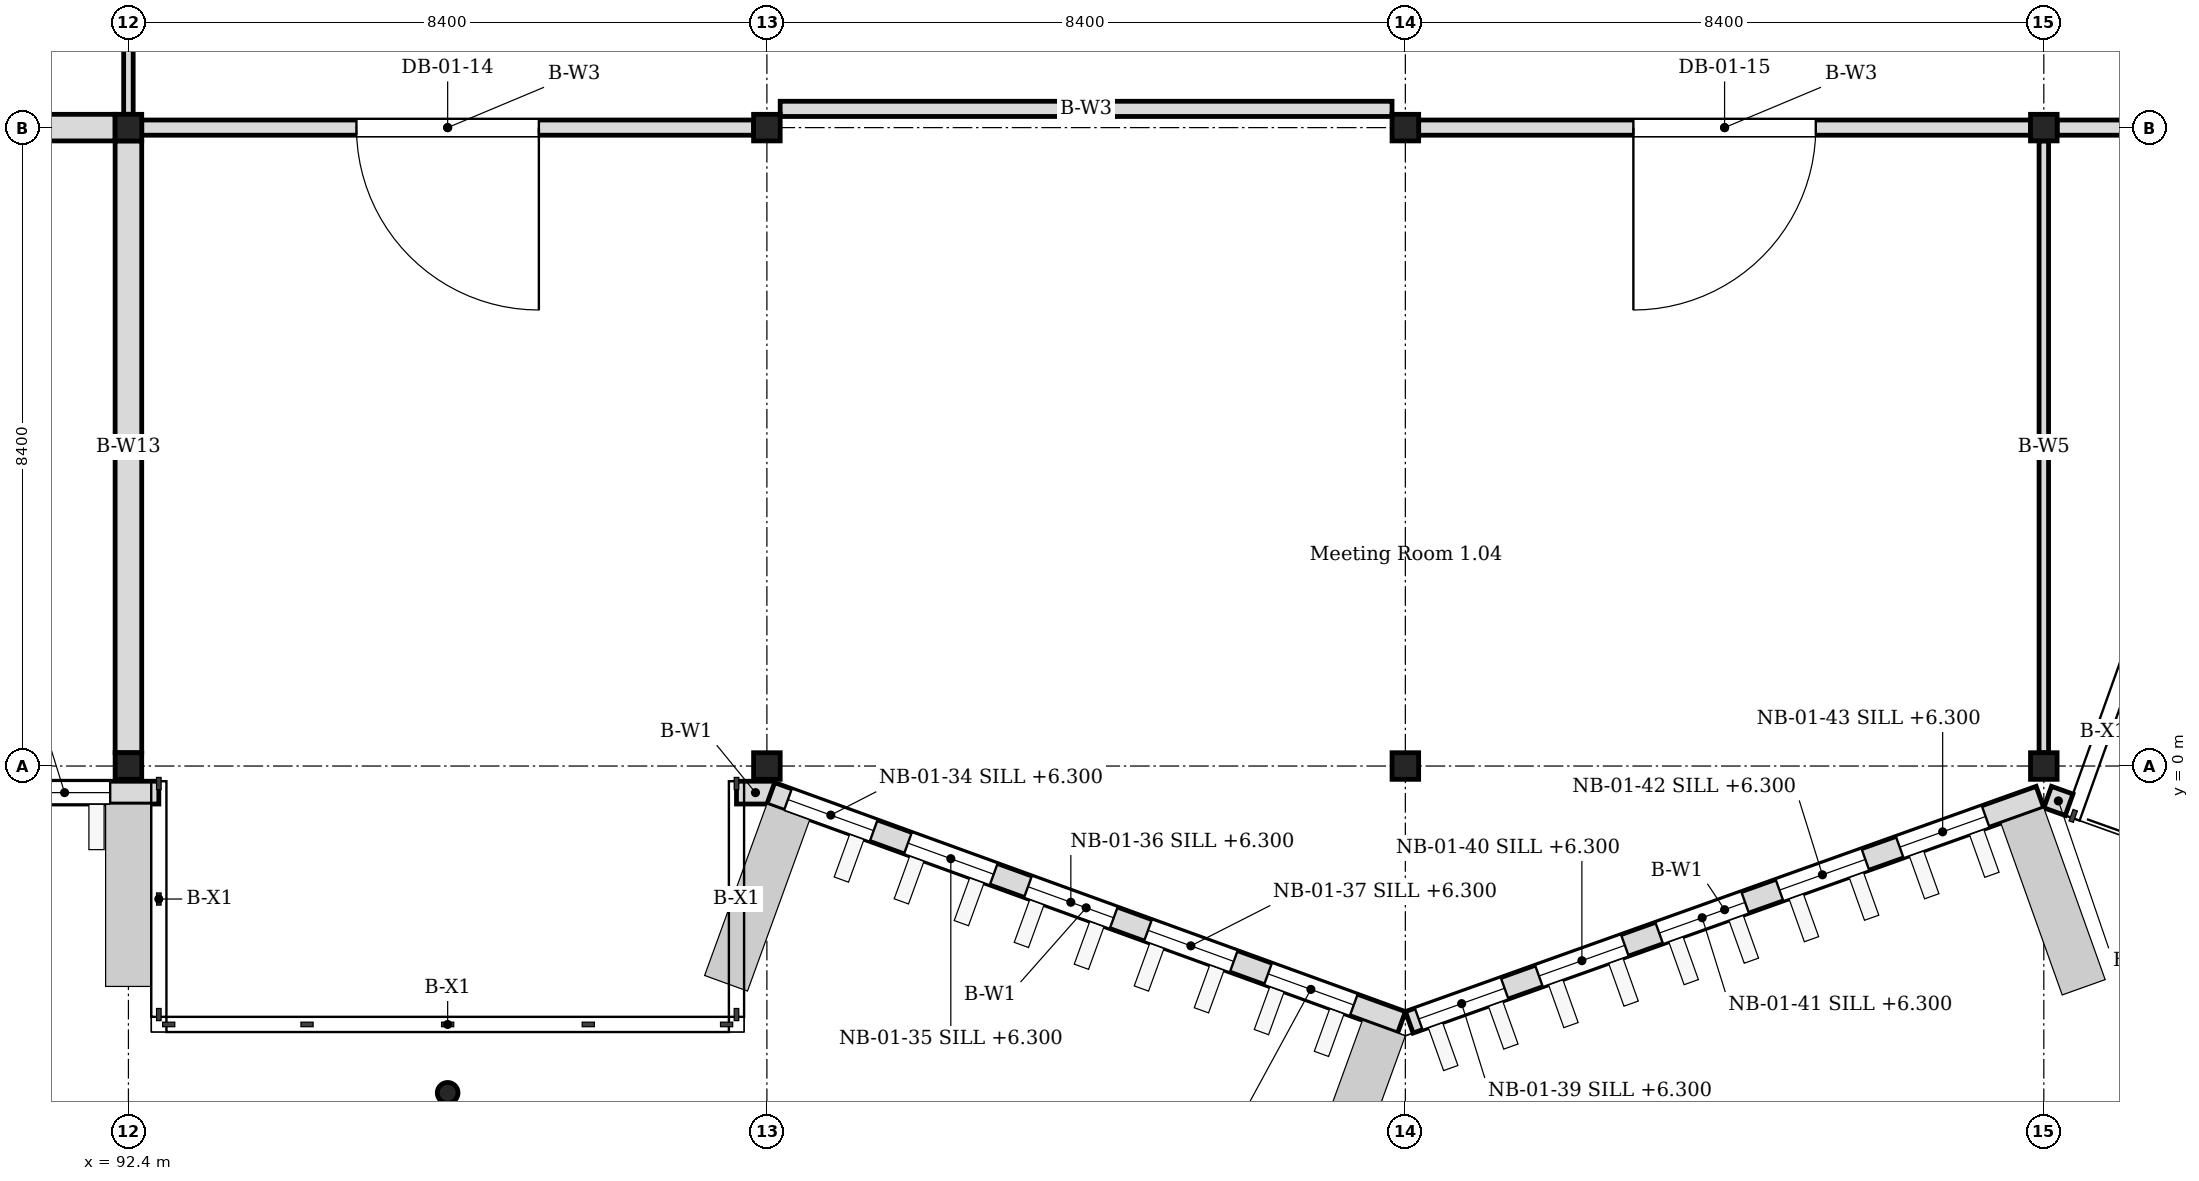
"""IFC4 building model, lengths in metres.
Left out: names, types, materials, properties, quantities, classifications, styles, units other than length and angle.
Written with IfcOpenShell. Run it as: python <this file> out.ifc"""

import sys

from ifc_helpers import new_model, si_unit, direction, frame, frame_2d, origin, origin_2d, place, context, subcontext, project, spatial, rectangle, hollow_circle, i_section, extrude, element, fill, save


model = new_model("IFC4")
c1 = context("Model", 3, precision=1e-05, world=origin(), true_north=direction((0.0, 1.0)))
c2 = subcontext(c1, "Body", "Model", "MODEL_VIEW")
j1 = project(units=[si_unit("LENGTHUNIT", "METRE"), si_unit("PLANEANGLEUNIT", "RADIAN")], contexts=[c1])
p1 = place(None, origin())
s1 = spatial("IfcSite", under=j1, at=p1, CompositionType="ELEMENT")
p2 = place(p1, origin())
s2 = spatial("IfcBuilding", under=s1, at=p2, CompositionType="ELEMENT")
p3 = place(p2, frame((0.0, 0.0, 6.0)))
s3 = spatial("IfcBuildingStorey", under=s2, at=p3, CompositionType="ELEMENT", Elevation=6.0)
for number, where, z_axis, x_axis in (
    (1, (92.4, 0.0, 0.0), (0.0, 0.0, 1.0), (1.0, 0.0, 0.0)),
    (2, (92.4, 8.4, 0.0), (0.0, 0.0, 1.0), (1.0, 0.0, 0.0)),
    (3, (100.8, 0.0, 0.0), (0.0, 0.0, 1.0), (1.0, 0.0, 0.0)),
    (4, (100.8, 8.4, 0.0), (0.0, 0.0, 1.0), (1.0, 0.0, 0.0)),
    (5, (109.2, 0.0, 0.0), (0.0, 0.0, 1.0), (1.0, 0.0, 0.0)),
    (6, (109.2, 8.4, 0.0), (0.0, 0.0, 1.0), (1.0, 0.0, 0.0)),
    (7, (117.6, 0.0, 0.0), (0.0, 0.0, 1.0), (1.0, 0.0, 0.0)),
    (8, (117.6, 8.4, 0.0), (0.0, 0.0, 1.0), (1.0, 0.0, 0.0)),
):
    element("IfcColumn", number, at=place(p3, frame(where, z_axis=z_axis, x_axis=x_axis)), inside=s3, PredefinedType="COLUMN", context=c2, shape_type="SweptSolid", body=[
        extrude(i_section(OverallWidth=0.35, OverallDepth=0.35, WebThickness=0.012, FlangeThickness=0.019, FilletRadius=0.013, at=origin_2d()), origin(), (0.0, 0.0, 1.0), 4.2),
    ])
p4 = place(p2, origin())
s4 = spatial("IfcBuildingStorey", under=s2, at=p4, CompositionType="ELEMENT", Elevation=0.0)
p5 = place(p4, frame((96.6, -4.3, 0.0), z_axis=(0.0, 0.0, 1.0), x_axis=(1.0, 0.0, 0.0)))
e9 = element("IfcColumn", 9, at=p5, inside=s4, PredefinedType="COLUMN", context=c2, shape_type="SweptSolid", body=[
    extrude(hollow_circle(Radius=0.136, WallThickness=0.012, at=origin_2d()), origin(), (0.0, 0.0, 1.0), 8.47),
])
p6 = place(p3, frame((83.6, -0.35, 0.0), z_axis=(0.0, 0.0, 1.0), x_axis=(1.0, 0.0, 0.0)))
e10 = element("IfcWall", 10, at=p6, inside=s3, PredefinedType="SOLIDWALL", context=c2, shape_type="SweptSolid", body=[
    extrude(rectangle(XDim=9.2, YDim=0.3, at=frame_2d((4.6, 0.0))), origin(), (0.0, 0.0, 1.0), 4.05),
])
p7 = place(p6, frame((0.64, 0.0, 0.3)))
e11 = element("IfcOpeningElement", 11, at=p7, cuts=e10, PredefinedType="OPENING", context=c2, shape_type="SweptSolid", body=[
    extrude(rectangle(XDim=1.2, YDim=3.3, at=frame_2d((0.6, 1.65))), frame((0.0, 0.16, 0.0), z_axis=(0.0, -1.0, 0.0), x_axis=(1.0, 0.0, 0.0)), (0.0, 0.0, 1.0), 0.32),
])
p8 = place(p6, frame((2.32, 0.0, 0.3)))
e12 = element("IfcOpeningElement", 12, at=p8, cuts=e10, PredefinedType="OPENING", context=c2, shape_type="SweptSolid", body=[
    extrude(rectangle(XDim=1.2, YDim=3.3, at=frame_2d((0.6, 1.65))), frame((0.0, 0.16, 0.0), z_axis=(0.0, -1.0, 0.0), x_axis=(1.0, 0.0, 0.0)), (0.0, 0.0, 1.0), 0.32),
])
p9 = place(p6, frame((4.0, 0.0, 0.3)))
e13 = element("IfcOpeningElement", 13, at=p9, cuts=e10, PredefinedType="OPENING", context=c2, shape_type="SweptSolid", body=[
    extrude(rectangle(XDim=1.2, YDim=3.3, at=frame_2d((0.6, 1.65))), frame((0.0, 0.16, 0.0), z_axis=(0.0, -1.0, 0.0), x_axis=(1.0, 0.0, 0.0)), (0.0, 0.0, 1.0), 0.32),
])
p10 = place(p6, frame((5.68, 0.0, 0.3)))
e14 = element("IfcOpeningElement", 14, at=p10, cuts=e10, PredefinedType="OPENING", context=c2, shape_type="SweptSolid", body=[
    extrude(rectangle(XDim=1.2, YDim=3.3, at=frame_2d((0.6, 1.65))), frame((0.0, 0.16, 0.0), z_axis=(0.0, -1.0, 0.0), x_axis=(1.0, 0.0, 0.0)), (0.0, 0.0, 1.0), 0.32),
])
p11 = place(p6, frame((7.36, 0.0, 0.3)))
e15 = element("IfcOpeningElement", 15, at=p11, cuts=e10, PredefinedType="OPENING", context=c2, shape_type="SweptSolid", body=[
    extrude(rectangle(XDim=1.2, YDim=3.3, at=frame_2d((0.6, 1.65))), frame((0.0, 0.16, 0.0), z_axis=(0.0, -1.0, 0.0), x_axis=(1.0, 0.0, 0.0)), (0.0, 0.0, 1.0), 0.32),
])
p12 = place(p3, frame((100.4, -0.35, 0.0), z_axis=(0.0, 0.0, 1.0), x_axis=(1.0, 0.0, 0.0)))
e16 = element("IfcWall", 16, at=p12, inside=s3, PredefinedType="SOLIDWALL", context=c2, shape_type="SweptSolid", body=[
    extrude(rectangle(XDim=0.5, YDim=0.3, at=frame_2d((0.25, 0.0))), origin(), (0.0, 0.0, 1.0), 4.05),
])
p13 = place(p3, frame((100.851, -0.359, 0.0), z_axis=(0.0, 0.0, 1.0), x_axis=(0.939953187971, -0.341303390584, 0.0)))
e17 = element("IfcWall", 17, at=p13, inside=s3, PredefinedType="SOLIDWALL", context=c2, shape_type="SweptSolid", body=[
    extrude(rectangle(XDim=8.828, YDim=0.3, at=frame_2d((4.414, 0.0))), origin(), (0.0, 0.0, 1.0), 4.05),
])
p14 = place(p13, frame((0.24, 0.0, 0.3)))
e18 = element("IfcOpeningElement", 18, at=p14, cuts=e17, PredefinedType="OPENING", context=c2, shape_type="SweptSolid", body=[
    extrude(rectangle(XDim=1.2, YDim=3.3, at=frame_2d((0.6, 1.65))), frame((0.0, 0.16, 0.0), z_axis=(0.0, -1.0, 0.0), x_axis=(1.0, 0.0, 0.0)), (0.0, 0.0, 1.0), 0.32),
])
p15 = place(p13, frame((1.92, 0.0, 0.3)))
e19 = element("IfcOpeningElement", 19, at=p15, cuts=e17, PredefinedType="OPENING", context=c2, shape_type="SweptSolid", body=[
    extrude(rectangle(XDim=1.2, YDim=3.3, at=frame_2d((0.6, 1.65))), frame((0.0, 0.16, 0.0), z_axis=(0.0, -1.0, 0.0), x_axis=(1.0, 0.0, 0.0)), (0.0, 0.0, 1.0), 0.32),
])
p16 = place(p13, frame((3.6, 0.0, 0.3)))
e20 = element("IfcOpeningElement", 20, at=p16, cuts=e17, PredefinedType="OPENING", context=c2, shape_type="SweptSolid", body=[
    extrude(rectangle(XDim=1.2, YDim=3.3, at=frame_2d((0.6, 1.65))), frame((0.0, 0.16, 0.0), z_axis=(0.0, -1.0, 0.0), x_axis=(1.0, 0.0, 0.0)), (0.0, 0.0, 1.0), 0.32),
])
p17 = place(p13, frame((5.28, 0.0, 0.3)))
e21 = element("IfcOpeningElement", 21, at=p17, cuts=e17, PredefinedType="OPENING", context=c2, shape_type="SweptSolid", body=[
    extrude(rectangle(XDim=1.2, YDim=3.3, at=frame_2d((0.6, 1.65))), frame((0.0, 0.16, 0.0), z_axis=(0.0, -1.0, 0.0), x_axis=(1.0, 0.0, 0.0)), (0.0, 0.0, 1.0), 0.32),
])
p18 = place(p13, frame((6.96, 0.0, 0.3)))
e22 = element("IfcOpeningElement", 22, at=p18, cuts=e17, PredefinedType="OPENING", context=c2, shape_type="SweptSolid", body=[
    extrude(rectangle(XDim=1.2, YDim=3.3, at=frame_2d((0.6, 1.65))), frame((0.0, 0.16, 0.0), z_axis=(0.0, -1.0, 0.0), x_axis=(1.0, 0.0, 0.0)), (0.0, 0.0, 1.0), 0.32),
])
p19 = place(p3, frame((109.251, -3.372, 0.0), z_axis=(0.0, 0.0, 1.0), x_axis=(0.941744418946, 0.336329376334, 0.0)))
e23 = element("IfcWall", 23, at=p19, inside=s3, PredefinedType="SOLIDWALL", context=c2, shape_type="SweptSolid", body=[
    extrude(rectangle(XDim=8.812, YDim=0.3, at=frame_2d((4.406, 0.0))), origin(), (0.0, 0.0, 1.0), 4.05),
])
p20 = place(p19, frame((0.132, 0.0, 0.3)))
e24 = element("IfcOpeningElement", 24, at=p20, cuts=e23, PredefinedType="OPENING", context=c2, shape_type="SweptSolid", body=[
    extrude(rectangle(XDim=1.2, YDim=3.3, at=frame_2d((0.6, 1.65))), frame((0.0, 0.16, 0.0), z_axis=(0.0, -1.0, 0.0), x_axis=(1.0, 0.0, 0.0)), (0.0, 0.0, 1.0), 0.32),
])
p21 = place(p19, frame((1.812, 0.0, 0.3)))
e25 = element("IfcOpeningElement", 25, at=p21, cuts=e23, PredefinedType="OPENING", context=c2, shape_type="SweptSolid", body=[
    extrude(rectangle(XDim=1.2, YDim=3.3, at=frame_2d((0.6, 1.65))), frame((0.0, 0.16, 0.0), z_axis=(0.0, -1.0, 0.0), x_axis=(1.0, 0.0, 0.0)), (0.0, 0.0, 1.0), 0.32),
])
p22 = place(p19, frame((3.492, 0.0, 0.3)))
e26 = element("IfcOpeningElement", 26, at=p22, cuts=e23, PredefinedType="OPENING", context=c2, shape_type="SweptSolid", body=[
    extrude(rectangle(XDim=1.2, YDim=3.3, at=frame_2d((0.6, 1.65))), frame((0.0, 0.16, 0.0), z_axis=(0.0, -1.0, 0.0), x_axis=(1.0, 0.0, 0.0)), (0.0, 0.0, 1.0), 0.32),
])
p23 = place(p19, frame((5.172, 0.0, 0.3)))
e27 = element("IfcOpeningElement", 27, at=p23, cuts=e23, PredefinedType="OPENING", context=c2, shape_type="SweptSolid", body=[
    extrude(rectangle(XDim=1.2, YDim=3.3, at=frame_2d((0.6, 1.65))), frame((0.0, 0.16, 0.0), z_axis=(0.0, -1.0, 0.0), x_axis=(1.0, 0.0, 0.0)), (0.0, 0.0, 1.0), 0.32),
])
p24 = place(p19, frame((6.852, 0.0, 0.3)))
e28 = element("IfcOpeningElement", 28, at=p24, cuts=e23, PredefinedType="OPENING", context=c2, shape_type="SweptSolid", body=[
    extrude(rectangle(XDim=1.2, YDim=3.3, at=frame_2d((0.6, 1.65))), frame((0.0, 0.16, 0.0), z_axis=(0.0, -1.0, 0.0), x_axis=(1.0, 0.0, 0.0)), (0.0, 0.0, 1.0), 0.32),
])
p25 = place(p3, frame((117.65, -0.409, 0.0), z_axis=(0.0, 0.0, 1.0), x_axis=(0.941889038699, -0.335924156289, 0.0)))
e29 = element("IfcWall", 29, at=p25, inside=s3, PredefinedType="SOLIDWALL", context=c2, shape_type="SweptSolid", body=[
    extrude(rectangle(XDim=0.3, YDim=0.3, at=frame_2d((0.15, 0.0))), origin(), (0.0, 0.0, 1.0), 4.05),
])
p26 = place(p3, frame((84.175, 8.4, 0.0), z_axis=(0.0, 0.0, 1.0), x_axis=(1.0, 0.0, 0.0)))
e30 = element("IfcWall", 30, at=p26, inside=s3, PredefinedType="PARTITIONING", context=c2, shape_type="SweptSolid", body=[
    extrude(rectangle(XDim=8.05, YDim=0.35, at=frame_2d((4.025, 0.0))), origin(), (0.0, 0.0, 1.0), 3.35),
])
p27 = place(p26, frame((3.475, 0.0, 0.0)))
e31 = element("IfcOpeningElement", 31, at=p27, cuts=e30, PredefinedType="OPENING", context=c2, shape_type="SweptSolid", body=[
    extrude(rectangle(XDim=1.1, YDim=2.4, at=frame_2d((0.55, 1.2))), frame((0.0, 0.185, 0.0), z_axis=(0.0, -1.0, 0.0), x_axis=(1.0, 0.0, 0.0)), (0.0, 0.0, 1.0), 0.37),
])
p28 = place(p3, frame((92.575, 8.4, 0.0), z_axis=(0.0, 0.0, 1.0), x_axis=(1.0, 0.0, 0.0)))
e32 = element("IfcWall", 32, at=p28, inside=s3, PredefinedType="PARTITIONING", context=c2, shape_type="SweptSolid", body=[
    extrude(rectangle(XDim=8.05, YDim=0.2, at=frame_2d((4.025, 0.0))), origin(), (0.0, 0.0, 1.0), 3.35),
])
p29 = place(p28, frame((2.825, 0.0, 0.0)))
e33 = element("IfcOpeningElement", 33, at=p29, cuts=e32, PredefinedType="OPENING", context=c2, shape_type="SweptSolid", body=[
    extrude(rectangle(XDim=2.4, YDim=2.2, at=frame_2d((1.2, 1.1))), frame((0.0, 0.11, 0.0), z_axis=(0.0, -1.0, 0.0), x_axis=(1.0, 0.0, 0.0)), (0.0, 0.0, 1.0), 0.22),
])
p30 = place(p3, frame((100.975, 8.646, 0.0), z_axis=(0.0, 0.0, 1.0), x_axis=(1.0, 0.0, 0.0)))
e34 = element("IfcWall", 34, at=p30, inside=s3, PredefinedType="PARTITIONING", context=c2, shape_type="SweptSolid", body=[
    extrude(rectangle(XDim=8.05, YDim=0.2, at=frame_2d((4.025, 0.0))), origin(), (0.0, 0.0, 1.0), 3.35),
])
p31 = place(p3, frame((109.375, 8.4, 0.0), z_axis=(0.0, 0.0, 1.0), x_axis=(1.0, 0.0, 0.0)))
e35 = element("IfcWall", 35, at=p31, inside=s3, PredefinedType="PARTITIONING", context=c2, shape_type="SweptSolid", body=[
    extrude(rectangle(XDim=8.05, YDim=0.2, at=frame_2d((4.025, 0.0))), origin(), (0.0, 0.0, 1.0), 3.35),
])
p32 = place(p31, frame((2.825, 0.0, 0.0)))
e36 = element("IfcOpeningElement", 36, at=p32, cuts=e35, PredefinedType="OPENING", context=c2, shape_type="SweptSolid", body=[
    extrude(rectangle(XDim=2.4, YDim=2.2, at=frame_2d((1.2, 1.1))), frame((0.0, 0.11, 0.0), z_axis=(0.0, -1.0, 0.0), x_axis=(1.0, 0.0, 0.0)), (0.0, 0.0, 1.0), 0.22),
])
p33 = place(p3, frame((117.775, 8.4, 0.0), z_axis=(0.0, 0.0, 1.0), x_axis=(1.0, 0.0, 0.0)))
e37 = element("IfcWall", 37, at=p33, inside=s3, PredefinedType="PARTITIONING", context=c2, shape_type="SweptSolid", body=[
    extrude(rectangle(XDim=8.05, YDim=0.2, at=frame_2d((4.025, 0.0))), origin(), (0.0, 0.0, 1.0), 3.35),
])
p34 = place(p33, frame((3.125, 0.0, 0.0)))
e38 = element("IfcOpeningElement", 38, at=p34, cuts=e37, PredefinedType="OPENING", context=c2, shape_type="SweptSolid", body=[
    extrude(rectangle(XDim=1.8, YDim=2.1, at=frame_2d((0.9, 1.05))), frame((0.0, 0.11, 0.0), z_axis=(0.0, -1.0, 0.0), x_axis=(1.0, 0.0, 0.0)), (0.0, 0.0, 1.0), 0.22),
])
p35 = place(p3, frame((92.4, 0.175, 0.0), z_axis=(0.0, 0.0, 1.0), x_axis=(0.0, 1.0, 0.0)))
e39 = element("IfcWall", 39, at=p35, inside=s3, PredefinedType="PARTITIONING", context=c2, shape_type="SweptSolid", body=[
    extrude(rectangle(XDim=8.05, YDim=0.35, at=frame_2d((4.025, 0.0))), origin(), (0.0, 0.0, 1.0), 3.35),
])
p36 = place(p3, frame((92.4, 8.575, 0.0), z_axis=(0.0, 0.0, 1.0), x_axis=(0.0, 1.0, 0.0)))
e40 = element("IfcWall", 40, at=p36, inside=s3, PredefinedType="PARTITIONING", context=c2, shape_type="SweptSolid", body=[
    extrude(rectangle(XDim=8.05, YDim=0.125, at=frame_2d((4.025, 0.0))), origin(), (0.0, 0.0, 1.0), 3.35),
])
p37 = place(p36, frame((2.825, 0.0, 0.0)))
e41 = element("IfcOpeningElement", 41, at=p37, cuts=e40, PredefinedType="OPENING", context=c2, shape_type="SweptSolid", body=[
    extrude(rectangle(XDim=2.4, YDim=2.2, at=frame_2d((1.2, 1.1))), frame((0.0, 0.073, 0.0), z_axis=(0.0, -1.0, 0.0), x_axis=(1.0, 0.0, 0.0)), (0.0, 0.0, 1.0), 0.145),
])
p38 = place(p3, frame((117.6, 0.175, 0.0), z_axis=(0.0, 0.0, 1.0), x_axis=(0.0, 1.0, 0.0)))
e42 = element("IfcWall", 42, at=p38, inside=s3, PredefinedType="MOVABLE", context=c2, shape_type="SweptSolid", body=[
    extrude(rectangle(XDim=8.05, YDim=0.125, at=frame_2d((4.025, 0.0))), origin(), (0.0, 0.0, 1.0), 3.35),
])
p39 = place(p11, origin())
e43 = element("IfcWindow", 43, at=p39, inside=s3, PartitioningType="TRIPLE_PANEL_VERTICAL", PredefinedType="WINDOW", context=c2, shape_type="SweptSolid", body=[
    extrude(rectangle(XDim=1.2, YDim=3.3, at=frame_2d((0.6, 1.65))), frame((0.0, 0.03, 0.0), z_axis=(0.0, -1.0, 0.0), x_axis=(1.0, 0.0, 0.0)), (0.0, 0.0, 1.0), 0.06),
])
fill(e15, e43)
p40 = place(p14, origin())
e44 = element("IfcWindow", 44, at=p40, inside=s3, PartitioningType="TRIPLE_PANEL_VERTICAL", PredefinedType="WINDOW", context=c2, shape_type="SweptSolid", body=[
    extrude(rectangle(XDim=1.2, YDim=3.3, at=frame_2d((0.6, 1.65))), frame((0.0, 0.03, 0.0), z_axis=(0.0, -1.0, 0.0), x_axis=(1.0, 0.0, 0.0)), (0.0, 0.0, 1.0), 0.06),
])
fill(e18, e44)
p41 = place(p15, origin())
e45 = element("IfcWindow", 45, at=p41, inside=s3, PartitioningType="TRIPLE_PANEL_VERTICAL", PredefinedType="WINDOW", context=c2, shape_type="SweptSolid", body=[
    extrude(rectangle(XDim=1.2, YDim=3.3, at=frame_2d((0.6, 1.65))), frame((0.0, 0.03, 0.0), z_axis=(0.0, -1.0, 0.0), x_axis=(1.0, 0.0, 0.0)), (0.0, 0.0, 1.0), 0.06),
])
fill(e19, e45)
p42 = place(p16, origin())
e46 = element("IfcWindow", 46, at=p42, inside=s3, PartitioningType="TRIPLE_PANEL_VERTICAL", PredefinedType="WINDOW", context=c2, shape_type="SweptSolid", body=[
    extrude(rectangle(XDim=1.2, YDim=3.3, at=frame_2d((0.6, 1.65))), frame((0.0, 0.03, 0.0), z_axis=(0.0, -1.0, 0.0), x_axis=(1.0, 0.0, 0.0)), (0.0, 0.0, 1.0), 0.06),
])
fill(e20, e46)
p43 = place(p17, origin())
e47 = element("IfcWindow", 47, at=p43, inside=s3, PartitioningType="TRIPLE_PANEL_VERTICAL", PredefinedType="WINDOW", context=c2, shape_type="SweptSolid", body=[
    extrude(rectangle(XDim=1.2, YDim=3.3, at=frame_2d((0.6, 1.65))), frame((0.0, 0.03, 0.0), z_axis=(0.0, -1.0, 0.0), x_axis=(1.0, 0.0, 0.0)), (0.0, 0.0, 1.0), 0.06),
])
fill(e21, e47)
p44 = place(p18, origin())
e48 = element("IfcWindow", 48, at=p44, inside=s3, PartitioningType="TRIPLE_PANEL_VERTICAL", PredefinedType="WINDOW", context=c2, shape_type="SweptSolid", body=[
    extrude(rectangle(XDim=1.2, YDim=3.3, at=frame_2d((0.6, 1.65))), frame((0.0, 0.03, 0.0), z_axis=(0.0, -1.0, 0.0), x_axis=(1.0, 0.0, 0.0)), (0.0, 0.0, 1.0), 0.06),
])
fill(e22, e48)
p45 = place(p20, origin())
e49 = element("IfcWindow", 49, at=p45, inside=s3, PartitioningType="TRIPLE_PANEL_VERTICAL", PredefinedType="WINDOW", context=c2, shape_type="SweptSolid", body=[
    extrude(rectangle(XDim=1.2, YDim=3.3, at=frame_2d((0.6, 1.65))), frame((0.0, 0.03, 0.0), z_axis=(0.0, -1.0, 0.0), x_axis=(1.0, 0.0, 0.0)), (0.0, 0.0, 1.0), 0.06),
])
fill(e24, e49)
p46 = place(p21, origin())
e50 = element("IfcWindow", 50, at=p46, inside=s3, PartitioningType="TRIPLE_PANEL_VERTICAL", PredefinedType="WINDOW", context=c2, shape_type="SweptSolid", body=[
    extrude(rectangle(XDim=1.2, YDim=3.3, at=frame_2d((0.6, 1.65))), frame((0.0, 0.03, 0.0), z_axis=(0.0, -1.0, 0.0), x_axis=(1.0, 0.0, 0.0)), (0.0, 0.0, 1.0), 0.06),
])
fill(e25, e50)
p47 = place(p22, origin())
e51 = element("IfcWindow", 51, at=p47, inside=s3, PartitioningType="TRIPLE_PANEL_VERTICAL", PredefinedType="WINDOW", context=c2, shape_type="SweptSolid", body=[
    extrude(rectangle(XDim=1.2, YDim=3.3, at=frame_2d((0.6, 1.65))), frame((0.0, 0.03, 0.0), z_axis=(0.0, -1.0, 0.0), x_axis=(1.0, 0.0, 0.0)), (0.0, 0.0, 1.0), 0.06),
])
fill(e26, e51)
p48 = place(p23, origin())
e52 = element("IfcWindow", 52, at=p48, inside=s3, PartitioningType="TRIPLE_PANEL_VERTICAL", PredefinedType="WINDOW", context=c2, shape_type="SweptSolid", body=[
    extrude(rectangle(XDim=1.2, YDim=3.3, at=frame_2d((0.6, 1.65))), frame((0.0, 0.03, 0.0), z_axis=(0.0, -1.0, 0.0), x_axis=(1.0, 0.0, 0.0)), (0.0, 0.0, 1.0), 0.06),
])
fill(e27, e52)
p49 = place(p24, origin())
e53 = element("IfcWindow", 53, at=p49, inside=s3, PartitioningType="TRIPLE_PANEL_VERTICAL", PredefinedType="WINDOW", context=c2, shape_type="SweptSolid", body=[
    extrude(rectangle(XDim=1.2, YDim=3.3, at=frame_2d((0.6, 1.65))), frame((0.0, 0.03, 0.0), z_axis=(0.0, -1.0, 0.0), x_axis=(1.0, 0.0, 0.0)), (0.0, 0.0, 1.0), 0.06),
])
fill(e28, e53)
p50 = place(p29, origin())
e54 = element("IfcDoor", 54, at=p50, inside=s3, OperationType="DOUBLE_DOOR_SINGLE_SWING", PredefinedType="DOOR", context=c2, shape_type="SweptSolid", body=[
    extrude(rectangle(XDim=2.4, YDim=2.2, at=frame_2d((1.2, 1.1))), frame((0.0, 0.025, 0.0), z_axis=(0.0, -1.0, 0.0), x_axis=(1.0, 0.0, 0.0)), (0.0, 0.0, 1.0), 0.05),
])
fill(e33, e54)
p51 = place(p32, origin())
e55 = element("IfcDoor", 55, at=p51, inside=s3, OperationType="DOUBLE_DOOR_SINGLE_SWING", PredefinedType="DOOR", context=c2, shape_type="SweptSolid", body=[
    extrude(rectangle(XDim=2.4, YDim=2.2, at=frame_2d((1.2, 1.1))), frame((0.0, 0.025, 0.0), z_axis=(0.0, -1.0, 0.0), x_axis=(1.0, 0.0, 0.0)), (0.0, 0.0, 1.0), 0.05),
])
fill(e36, e55)
save(model, sys.argv[1])
